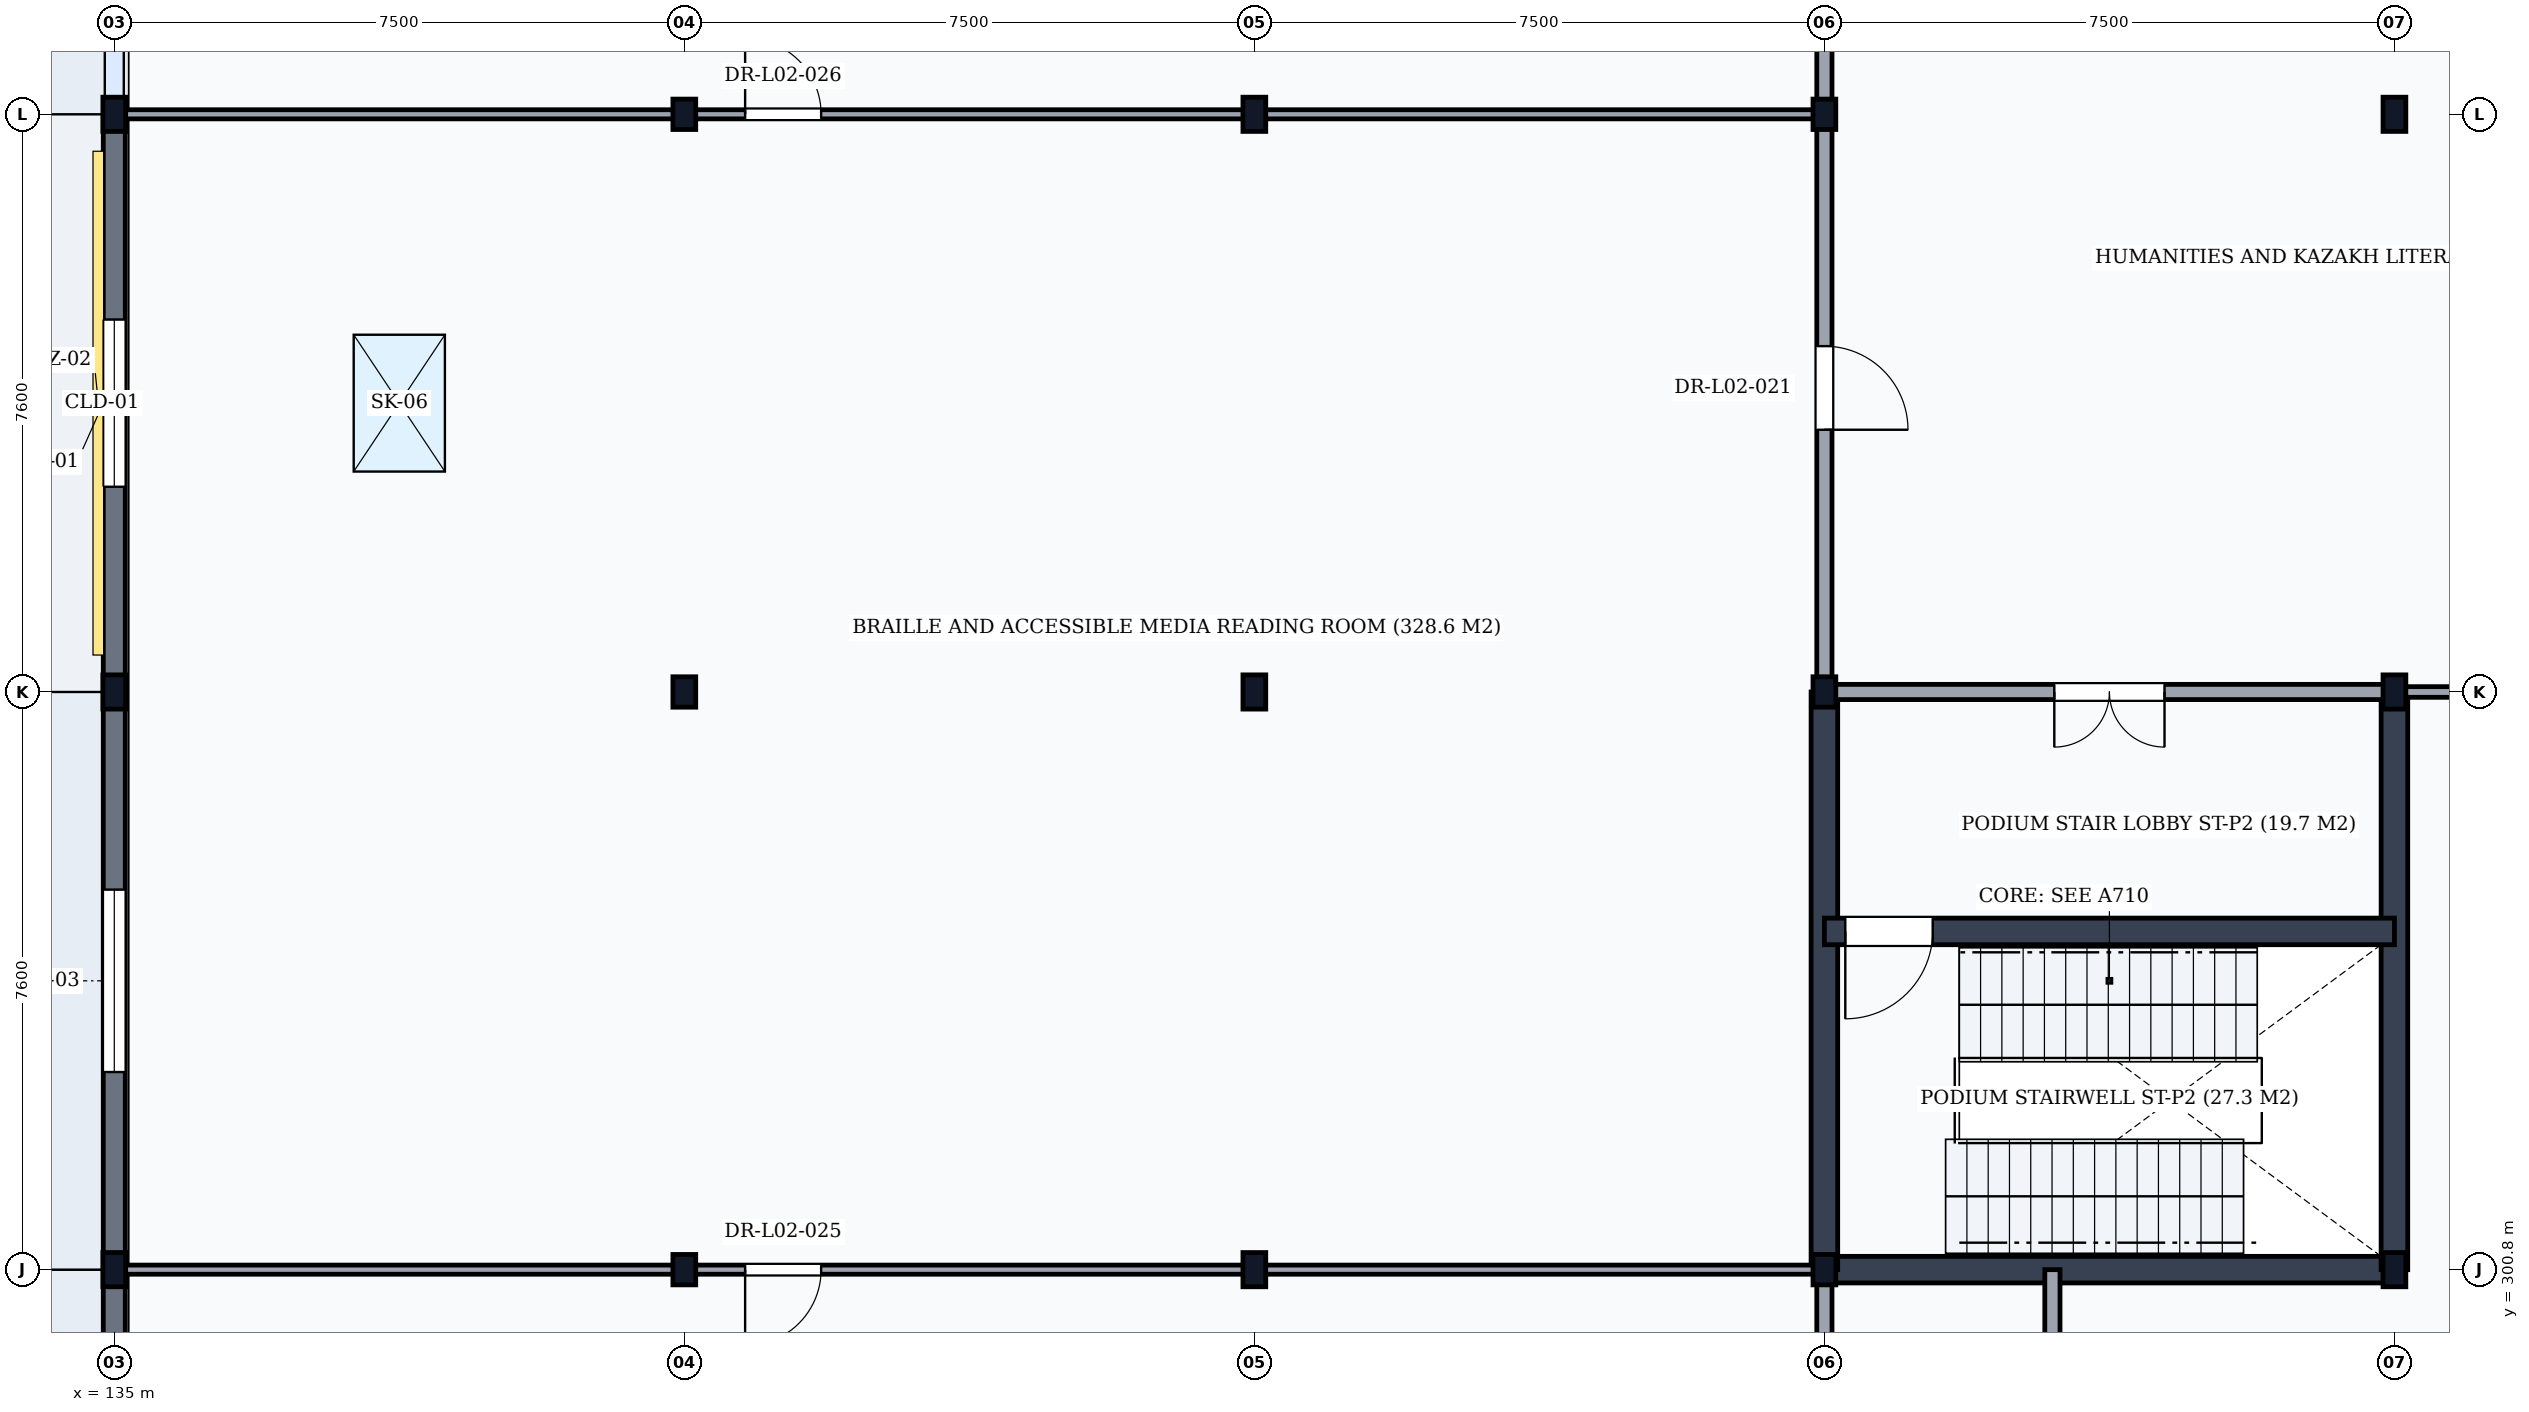
"""IFC4 building model, lengths in metres.
Left out: names, types, materials, properties, quantities, classifications, styles, units other than length and angle.
Written with IfcOpenShell. Run it as: python <this file> out.ifc"""

import sys

from ifc_helpers import new_model, si_unit, direction, frame, frame_2d, origin, origin_2d, place, context, subcontext, project, spatial, rectangle, i_section, extrude, element, fill, save


model = new_model("IFC4")
c1 = context("Model", 3, precision=1e-05, world=origin(), true_north=direction((0.0, 1.0)))
c2 = subcontext(c1, "Body", "Model", "MODEL_VIEW")
j1 = project(units=[si_unit("LENGTHUNIT", "METRE"), si_unit("PLANEANGLEUNIT", "RADIAN")], contexts=[c1])
p1 = place(None, origin())
s1 = spatial("IfcSite", under=j1, at=p1, CompositionType="ELEMENT")
p2 = place(p1, origin())
s2 = spatial("IfcBuilding", under=s1, at=p2, CompositionType="ELEMENT")
p3 = place(p2, frame((0.0, 0.0, 5.4)))
s3 = spatial("IfcBuildingStorey", under=s2, at=p3, CompositionType="ELEMENT", Elevation=5.4)
for number, where, z_axis, x_axis in (
    (1, (135.0, 300.8, 0.0), (0.0, 0.0, 1.0), (1.0, 0.0, 0.0)),
    (2, (135.0, 308.4, 0.0), (0.0, 0.0, 1.0), (1.0, 0.0, 0.0)),
    (3, (135.0, 316.0, 0.0), (0.0, 0.0, 1.0), (1.0, 0.0, 0.0)),
):
    element("IfcColumn", number, at=place(p3, frame(where, z_axis=z_axis, x_axis=x_axis)), inside=s3, PredefinedType="COLUMN", context=c2, shape_type="SweptSolid", body=[
        extrude(i_section(OverallWidth=0.3, OverallDepth=0.45, WebThickness=0.014, FlangeThickness=0.026, FilletRadius=0.027, at=origin_2d()), origin(), (0.0, 0.0, 1.0), 5.1),
    ])
for number, where, z_axis, x_axis in (
    (4, (142.5, 300.8, 0.0), (0.0, 0.0, 1.0), (1.0, 0.0, 0.0)),
    (5, (142.5, 308.4, 0.0), (0.0, 0.0, 1.0), (1.0, 0.0, 0.0)),
    (6, (142.5, 316.0, 0.0), (0.0, 0.0, 1.0), (1.0, 0.0, 0.0)),
):
    element("IfcColumn", number, at=place(p3, frame(where, z_axis=z_axis, x_axis=x_axis)), inside=s3, PredefinedType="COLUMN", context=c2, shape_type="SweptSolid", body=[
        extrude(i_section(OverallWidth=0.3, OverallDepth=0.4, WebThickness=0.013, FlangeThickness=0.024, FilletRadius=0.027, at=origin_2d()), origin(), (0.0, 0.0, 1.0), 5.1),
    ])
for number, where, z_axis, x_axis in (
    (7, (150.0, 300.8, 0.0), (0.0, 0.0, 1.0), (1.0, 0.0, 0.0)),
    (8, (150.0, 308.4, 0.0), (0.0, 0.0, 1.0), (1.0, 0.0, 0.0)),
    (9, (150.0, 316.0, 0.0), (0.0, 0.0, 1.0), (1.0, 0.0, 0.0)),
):
    element("IfcColumn", number, at=place(p3, frame(where, z_axis=z_axis, x_axis=x_axis)), inside=s3, PredefinedType="COLUMN", context=c2, shape_type="SweptSolid", body=[
        extrude(i_section(OverallWidth=0.3, OverallDepth=0.45, WebThickness=0.014, FlangeThickness=0.026, FilletRadius=0.027, at=origin_2d()), origin(), (0.0, 0.0, 1.0), 5.1),
    ])
for number, where, z_axis, x_axis in (
    (10, (157.5, 300.8, 0.0), (0.0, 0.0, 1.0), (1.0, 0.0, 0.0)),
    (11, (157.5, 308.4, 0.0), (0.0, 0.0, 1.0), (1.0, 0.0, 0.0)),
    (12, (157.5, 316.0, 0.0), (0.0, 0.0, 1.0), (1.0, 0.0, 0.0)),
):
    element("IfcColumn", number, at=place(p3, frame(where, z_axis=z_axis, x_axis=x_axis)), inside=s3, PredefinedType="COLUMN", context=c2, shape_type="SweptSolid", body=[
        extrude(i_section(OverallWidth=0.3, OverallDepth=0.4, WebThickness=0.013, FlangeThickness=0.024, FilletRadius=0.027, at=origin_2d()), origin(), (0.0, 0.0, 1.0), 5.1),
    ])
for number, where, z_axis, x_axis in (
    (13, (165.0, 300.8, 0.0), (0.0, 0.0, 1.0), (1.0, 0.0, 0.0)),
    (14, (165.0, 308.4, 0.0), (0.0, 0.0, 1.0), (1.0, 0.0, 0.0)),
    (15, (165.0, 316.0, 0.0), (0.0, 0.0, 1.0), (1.0, 0.0, 0.0)),
):
    element("IfcColumn", number, at=place(p3, frame(where, z_axis=z_axis, x_axis=x_axis)), inside=s3, PredefinedType="COLUMN", context=c2, shape_type="SweptSolid", body=[
        extrude(i_section(OverallWidth=0.3, OverallDepth=0.45, WebThickness=0.014, FlangeThickness=0.026, FilletRadius=0.027, at=origin_2d()), origin(), (0.0, 0.0, 1.0), 5.1),
    ])
p4 = place(p3, frame((135.0, 293.206, 0.0), z_axis=(0.0, 0.0, 1.0), x_axis=(0.0, 1.0, 0.0)))
e16 = element("IfcWall", 16, at=p4, inside=s3, PredefinedType="SOLIDWALL", context=c2, shape_type="SweptSolid", body=[
    extrude(rectangle(XDim=7.588, YDim=0.29, at=frame_2d((3.794, 0.0))), origin(), (0.0, 0.0, 1.0), 4.578),
])
p5 = place(p4, frame((2.494, 0.0, 0.95)))
e17 = element("IfcOpeningElement", 17, at=p5, cuts=e16, PredefinedType="OPENING", context=c2, shape_type="SweptSolid", body=[
    extrude(rectangle(XDim=2.6, YDim=3.0, at=frame_2d((1.3, 1.5))), frame((0.0, 0.16, 0.0), z_axis=(0.0, -1.0, 0.0), x_axis=(1.0, 0.0, 0.0)), (0.0, 0.0, 1.0), 0.32),
])
p6 = place(p3, frame((135.0, 300.806, 0.0), z_axis=(0.0, 0.0, 1.0), x_axis=(0.0, 1.0, 0.0)))
e18 = element("IfcWall", 18, at=p6, inside=s3, PredefinedType="SOLIDWALL", context=c2, shape_type="SweptSolid", body=[
    extrude(rectangle(XDim=7.588, YDim=0.29, at=frame_2d((3.794, 0.0))), origin(), (0.0, 0.0, 1.0), 4.578),
])
p7 = place(p6, frame((2.594, 0.0, 0.95)))
e19 = element("IfcOpeningElement", 19, at=p7, cuts=e18, PredefinedType="OPENING", context=c2, shape_type="SweptSolid", body=[
    extrude(rectangle(XDim=2.4, YDim=2.8, at=frame_2d((1.2, 1.4))), frame((0.0, 0.16, 0.0), z_axis=(0.0, -1.0, 0.0), x_axis=(1.0, 0.0, 0.0)), (0.0, 0.0, 1.0), 0.32),
])
p8 = place(p3, frame((135.0, 308.406, 0.0), z_axis=(0.0, 0.0, 1.0), x_axis=(0.0, 1.0, 0.0)))
e20 = element("IfcWall", 20, at=p8, inside=s3, PredefinedType="SOLIDWALL", context=c2, shape_type="SweptSolid", body=[
    extrude(rectangle(XDim=7.588, YDim=0.29, at=frame_2d((3.794, 0.0))), origin(), (0.0, 0.0, 1.0), 4.578),
])
p9 = place(p8, frame((2.694, 0.0, 0.95)))
e21 = element("IfcOpeningElement", 21, at=p9, cuts=e20, PredefinedType="OPENING", context=c2, shape_type="SweptSolid", body=[
    extrude(rectangle(XDim=2.2, YDim=2.8, at=frame_2d((1.1, 1.4))), frame((0.0, 0.16, 0.0), z_axis=(0.0, -1.0, 0.0), x_axis=(1.0, 0.0, 0.0)), (0.0, 0.0, 1.0), 0.32),
])
p10 = place(p3, frame((135.1, 248.6, 5.1), z_axis=(0.0, 0.0, 1.0), x_axis=(0.0, 1.0, 0.0)))
e22 = element("IfcWall", 22, at=p10, inside=s3, PredefinedType="PARAPET", context=c2, shape_type="SweptSolid", body=[
    extrude(rectangle(XDim=89.2, YDim=0.18, at=frame_2d((44.6, 0.0))), origin(), (0.0, 0.0, 1.0), 1.2),
])
p11 = place(p3, frame((157.5, 300.8, 0.0), z_axis=(0.0, 0.0, 1.0), x_axis=(1.0, 0.0, 0.0)))
e23 = element("IfcWall", 23, at=p11, inside=s3, PredefinedType="SHEAR", context=c2, shape_type="SweptSolid", body=[
    extrude(rectangle(XDim=7.5, YDim=0.35, at=frame_2d((3.75, 0.0))), origin(), (0.0, 0.0, 1.0), 4.86),
])
for number, where, z_axis, x_axis in (
    (24, (157.5, 300.8, 0.0), (0.0, 0.0, 1.0), (0.0, 1.0, 0.0)),
    (25, (165.0, 300.8, 0.0), (0.0, 0.0, 1.0), (0.0, 1.0, 0.0)),
):
    element("IfcWall", number, at=place(p3, frame(where, z_axis=z_axis, x_axis=x_axis)), inside=s3, PredefinedType="SHEAR", context=c2, shape_type="SweptSolid", body=[
        extrude(rectangle(XDim=7.6, YDim=0.35, at=frame_2d((3.8, 0.0))), origin(), (0.0, 0.0, 1.0), 4.86),
    ])
p12 = place(p3, frame((157.5, 305.25, 0.0), z_axis=(0.0, 0.0, 1.0), x_axis=(1.0, 0.0, 0.0)))
e26 = element("IfcWall", 26, at=p12, inside=s3, PredefinedType="SHEAR", context=c2, shape_type="SweptSolid", body=[
    extrude(rectangle(XDim=7.5, YDim=0.35, at=frame_2d((3.75, 0.0))), origin(), (0.0, 0.0, 1.0), 4.86),
])
p13 = place(p12, frame((0.275, 0.0, 0.0)))
e27 = element("IfcOpeningElement", 27, at=p13, cuts=e26, PredefinedType="OPENING", context=c2, shape_type="SweptSolid", body=[
    extrude(rectangle(XDim=1.15, YDim=2.15, at=frame_2d((0.575, 1.075))), frame((0.0, 0.19, 0.0), z_axis=(0.0, -1.0, 0.0), x_axis=(1.0, 0.0, 0.0)), (0.0, 0.0, 1.0), 0.38),
])
p14 = place(p3, frame((157.5, 308.4, 0.0), z_axis=(0.0, 0.0, 1.0), x_axis=(1.0, 0.0, 0.0)))
e28 = element("IfcWall", 28, at=p14, inside=s3, PredefinedType="PARTITIONING", context=c2, shape_type="SweptSolid", body=[
    extrude(rectangle(XDim=7.5, YDim=0.2, at=frame_2d((3.75, 0.0))), origin(), (0.0, 0.0, 1.0), 4.498),
])
p15 = place(p14, frame((3.025, 0.0, 0.0)))
e29 = element("IfcOpeningElement", 29, at=p15, cuts=e28, PredefinedType="OPENING", context=c2, shape_type="SweptSolid", body=[
    extrude(rectangle(XDim=1.45, YDim=2.2, at=frame_2d((0.725, 1.1))), frame((0.0, 0.115, 0.0), z_axis=(0.0, -1.0, 0.0), x_axis=(1.0, 0.0, 0.0)), (0.0, 0.0, 1.0), 0.23),
])
p16 = place(p3, frame((157.5, 258.2, 0.0), z_axis=(0.0, 0.0, 1.0), x_axis=(0.0, 1.0, 0.0)))
e30 = element("IfcWall", 30, at=p16, inside=s3, PredefinedType="PARTITIONING", context=c2, shape_type="SweptSolid", body=[
    extrude(rectangle(XDim=42.6, YDim=0.2, at=frame_2d((21.3, 0.0))), origin(), (0.0, 0.0, 1.0), 4.498),
])
p17 = place(p16, frame((9.45, 0.0, 0.0)))
e31 = element("IfcOpeningElement", 31, at=p17, cuts=e30, PredefinedType="OPENING", context=c2, shape_type="SweptSolid", body=[
    extrude(rectangle(XDim=1.1, YDim=2.1, at=frame_2d((0.55, 1.05))), frame((0.0, 0.115, 0.0), z_axis=(0.0, -1.0, 0.0), x_axis=(1.0, 0.0, 0.0)), (0.0, 0.0, 1.0), 0.23),
])
p18 = place(p16, frame((30.45, 0.0, 0.0)))
e32 = element("IfcOpeningElement", 32, at=p18, cuts=e30, PredefinedType="OPENING", context=c2, shape_type="SweptSolid", body=[
    extrude(rectangle(XDim=1.1, YDim=2.1, at=frame_2d((0.55, 1.05))), frame((0.0, 0.115, 0.0), z_axis=(0.0, -1.0, 0.0), x_axis=(1.0, 0.0, 0.0)), (0.0, 0.0, 1.0), 0.23),
])
p19 = place(p3, frame((157.5, 308.4, 0.0), z_axis=(0.0, 0.0, 1.0), x_axis=(0.0, 1.0, 0.0)))
e33 = element("IfcWall", 33, at=p19, inside=s3, PredefinedType="PARTITIONING", context=c2, shape_type="SweptSolid", body=[
    extrude(rectangle(XDim=29.6, YDim=0.2, at=frame_2d((14.8, 0.0))), origin(), (0.0, 0.0, 1.0), 4.498),
])
p20 = place(p19, frame((3.45, 0.0, 0.0)))
e34 = element("IfcOpeningElement", 34, at=p20, cuts=e33, PredefinedType="OPENING", context=c2, shape_type="SweptSolid", body=[
    extrude(rectangle(XDim=1.1, YDim=2.1, at=frame_2d((0.55, 1.05))), frame((0.0, 0.115, 0.0), z_axis=(0.0, -1.0, 0.0), x_axis=(1.0, 0.0, 0.0)), (0.0, 0.0, 1.0), 0.23),
])
p21 = place(p19, frame((17.25, 0.0, 0.0)))
e35 = element("IfcOpeningElement", 35, at=p21, cuts=e33, PredefinedType="OPENING", context=c2, shape_type="SweptSolid", body=[
    extrude(rectangle(XDim=1.5, YDim=2.25, at=frame_2d((0.75, 1.125))), frame((0.0, 0.115, 0.0), z_axis=(0.0, -1.0, 0.0), x_axis=(1.0, 0.0, 0.0)), (0.0, 0.0, 1.0), 0.23),
])
p22 = place(p3, frame((160.5, 258.2, 0.0), z_axis=(0.0, 0.0, 1.0), x_axis=(0.0, 1.0, 0.0)))
e36 = element("IfcWall", 36, at=p22, inside=s3, PredefinedType="PARTITIONING", context=c2, shape_type="SweptSolid", body=[
    extrude(rectangle(XDim=42.6, YDim=0.2, at=frame_2d((21.3, 0.0))), origin(), (0.0, 0.0, 1.0), 4.86),
])
p23 = place(p22, frame((20.34, 0.0, 0.0)))
e37 = element("IfcOpeningElement", 37, at=p23, cuts=e36, PredefinedType="OPENING", context=c2, shape_type="SweptSolid", body=[
    extrude(rectangle(XDim=1.8, YDim=2.4, at=frame_2d((0.9, 1.2))), frame((0.0, 0.115, 0.0), z_axis=(0.0, -1.0, 0.0), x_axis=(1.0, 0.0, 0.0)), (0.0, 0.0, 1.0), 0.23),
])
p24 = place(p3, frame((135.0, 300.8, 0.0), z_axis=(0.0, 0.0, 1.0), x_axis=(1.0, 0.0, 0.0)))
e38 = element("IfcWall", 38, at=p24, inside=s3, PredefinedType="PARTITIONING", context=c2, shape_type="SweptSolid", body=[
    extrude(rectangle(XDim=22.5, YDim=0.12, at=frame_2d((11.25, 0.0))), origin(), (0.0, 0.0, 1.0), 4.488),
])
p25 = place(p24, frame((8.3, 0.0, 0.0)))
e39 = element("IfcOpeningElement", 39, at=p25, cuts=e38, PredefinedType="OPENING", context=c2, shape_type="SweptSolid", body=[
    extrude(rectangle(XDim=1.0, YDim=2.1, at=frame_2d((0.5, 1.05))), frame((0.0, 0.075, 0.0), z_axis=(0.0, -1.0, 0.0), x_axis=(1.0, 0.0, 0.0)), (0.0, 0.0, 1.0), 0.15),
])
p26 = place(p3, frame((135.0, 316.0, 0.0), z_axis=(0.0, 0.0, 1.0), x_axis=(1.0, 0.0, 0.0)))
e40 = element("IfcWall", 40, at=p26, inside=s3, PredefinedType="PARTITIONING", context=c2, shape_type="SweptSolid", body=[
    extrude(rectangle(XDim=22.5, YDim=0.12, at=frame_2d((11.25, 0.0))), origin(), (0.0, 0.0, 1.0), 4.488),
])
p27 = place(p26, frame((8.3, 0.0, 0.0)))
e41 = element("IfcOpeningElement", 41, at=p27, cuts=e40, PredefinedType="OPENING", context=c2, shape_type="SweptSolid", body=[
    extrude(rectangle(XDim=1.0, YDim=2.1, at=frame_2d((0.5, 1.05))), frame((0.0, 0.075, 0.0), z_axis=(0.0, -1.0, 0.0), x_axis=(1.0, 0.0, 0.0)), (0.0, 0.0, 1.0), 0.15),
])
p28 = place(p3, frame((165.0, 308.4, 0.0), z_axis=(0.0, 0.0, 1.0), x_axis=(1.0, 0.0, 0.0)))
e42 = element("IfcWall", 42, at=p28, inside=s3, PredefinedType="PARTITIONING", context=c2, shape_type="SweptSolid", body=[
    extrude(rectangle(XDim=32.0, YDim=0.14, at=frame_2d((16.0, 0.0))), origin(), (0.0, 0.0, 1.0), 4.408),
])
p29 = place(p28, frame((16.6, 0.0, 0.0)))
e43 = element("IfcOpeningElement", 43, at=p29, cuts=e42, PredefinedType="OPENING", context=c2, shape_type="SweptSolid", body=[
    extrude(rectangle(XDim=1.8, YDim=2.4, at=frame_2d((0.9, 1.2))), frame((0.0, 0.085, 0.0), z_axis=(0.0, -1.0, 0.0), x_axis=(1.0, 0.0, 0.0)), (0.0, 0.0, 1.0), 0.17),
])
p30 = place(p7, origin())
e44 = element("IfcWindow", 44, at=p30, inside=s3, PartitioningType="DOUBLE_PANEL_VERTICAL", PredefinedType="WINDOW", context=c2, shape_type="SweptSolid", body=[
    extrude(rectangle(XDim=2.4, YDim=2.8, at=frame_2d((1.2, 1.4))), frame((0.0, 0.03, 0.0), z_axis=(0.0, -1.0, 0.0), x_axis=(1.0, 0.0, 0.0)), (0.0, 0.0, 1.0), 0.06),
])
fill(e19, e44)
p31 = place(p9, origin())
e45 = element("IfcWindow", 45, at=p31, inside=s3, PartitioningType="DOUBLE_PANEL_VERTICAL", PredefinedType="WINDOW", context=c2, shape_type="SweptSolid", body=[
    extrude(rectangle(XDim=2.2, YDim=2.8, at=frame_2d((1.1, 1.4))), frame((0.0, 0.03, 0.0), z_axis=(0.0, -1.0, 0.0), x_axis=(1.0, 0.0, 0.0)), (0.0, 0.0, 1.0), 0.06),
])
fill(e21, e45)
p32 = place(p2, frame((0.0, 0.0, 10.5)))
p33 = place(p32, frame((0.0, 0.0, -0.25)))
p34 = place(p33, frame((138.75, 312.2, -0.01)))
p35 = place(p34, frame((0.0, 0.0, 0.21)))
e46 = element("IfcWindow", 46, at=p35, inside=s3, PartitioningType="SINGLE_PANEL", PredefinedType="SKYLIGHT", context=c2, shape_type="SweptSolid", body=[
    extrude(rectangle(XDim=1.2, YDim=1.8, at=origin_2d()), origin(), (0.0, 0.0, 1.0), 0.05),
])
p36 = place(p13, frame((1.15, 0.0, 0.0), z_axis=(0.0, 0.0, 1.0), x_axis=(-1.0, 0.0, 0.0)))
e47 = element("IfcDoor", 47, at=p36, inside=s3, OperationType="SINGLE_SWING_RIGHT", PredefinedType="DOOR", context=c2, shape_type="SweptSolid", body=[
    extrude(rectangle(XDim=1.15, YDim=2.15, at=frame_2d((0.575, 1.075))), frame((0.0, 0.025, 0.0), z_axis=(0.0, -1.0, 0.0), x_axis=(1.0, 0.0, 0.0)), (0.0, 0.0, 1.0), 0.05),
])
fill(e27, e47)
p37 = place(p15, frame((1.45, 0.0, 0.0), z_axis=(0.0, 0.0, 1.0), x_axis=(-1.0, 0.0, 0.0)))
e48 = element("IfcDoor", 48, at=p37, inside=s3, OperationType="DOUBLE_DOOR_SINGLE_SWING", PredefinedType="DOOR", context=c2, shape_type="SweptSolid", body=[
    extrude(rectangle(XDim=1.45, YDim=2.2, at=frame_2d((0.725, 1.1))), frame((0.0, 0.025, 0.0), z_axis=(0.0, -1.0, 0.0), x_axis=(1.0, 0.0, 0.0)), (0.0, 0.0, 1.0), 0.05),
])
fill(e29, e48)
p38 = place(p20, frame((1.1, 0.0, 0.0), z_axis=(0.0, 0.0, 1.0), x_axis=(-1.0, 0.0, 0.0)))
e49 = element("IfcDoor", 49, at=p38, inside=s3, OperationType="SINGLE_SWING_RIGHT", PredefinedType="DOOR", context=c2, shape_type="SweptSolid", body=[
    extrude(rectangle(XDim=1.1, YDim=2.1, at=frame_2d((0.55, 1.05))), frame((0.0, 0.025, 0.0), z_axis=(0.0, -1.0, 0.0), x_axis=(1.0, 0.0, 0.0)), (0.0, 0.0, 1.0), 0.05),
])
fill(e34, e49)
p39 = place(p25, frame((1.0, 0.0, 0.0), z_axis=(0.0, 0.0, 1.0), x_axis=(-1.0, 0.0, 0.0)))
e50 = element("IfcDoor", 50, at=p39, inside=s3, OperationType="SINGLE_SWING_RIGHT", PredefinedType="DOOR", context=c2, shape_type="SweptSolid", body=[
    extrude(rectangle(XDim=1.0, YDim=2.1, at=frame_2d((0.5, 1.05))), frame((0.0, 0.025, 0.0), z_axis=(0.0, -1.0, 0.0), x_axis=(1.0, 0.0, 0.0)), (0.0, 0.0, 1.0), 0.05),
])
fill(e39, e50)
p40 = place(p27, origin())
e51 = element("IfcDoor", 51, at=p40, inside=s3, OperationType="SINGLE_SWING_LEFT", PredefinedType="DOOR", context=c2, shape_type="SweptSolid", body=[
    extrude(rectangle(XDim=1.0, YDim=2.1, at=frame_2d((0.5, 1.05))), frame((0.0, 0.025, 0.0), z_axis=(0.0, -1.0, 0.0), x_axis=(1.0, 0.0, 0.0)), (0.0, 0.0, 1.0), 0.05),
])
fill(e41, e51)
save(model, sys.argv[1])
